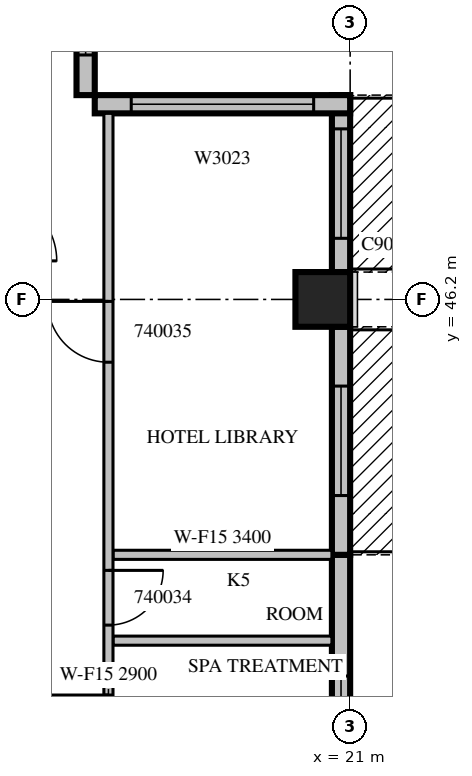
"""IFC4 building model, lengths in metres.
Left out: names, types, materials, properties, quantities, classifications, styles, units other than length and angle.
Written with IfcOpenShell. Run it as: python <this file> out.ifc"""

import sys

from ifc_helpers import new_model, si_unit, direction, frame, frame_2d, origin, origin_2d, place, context, subcontext, project, spatial, rectangle, extrude, source, transform, mapped, element, fill, save


model = new_model("IFC4")
c1 = context("Model", 3, precision=1e-05, world=origin(), true_north=direction((0.0, 1.0)))
c2 = subcontext(c1, "Body", "Model", "MODEL_VIEW")
j1 = project(units=[si_unit("LENGTHUNIT", "METRE"), si_unit("PLANEANGLEUNIT", "RADIAN")], contexts=[c1])
p1 = place(None, origin())
s1 = spatial("IfcSite", under=j1, at=p1, CompositionType="ELEMENT")
p2 = place(p1, origin())
s2 = spatial("IfcBuilding", under=s1, at=p2, CompositionType="ELEMENT")
p3 = place(p2, frame((0.0, 0.0, 185.4)))
s3 = spatial("IfcBuildingStorey", under=s2, at=p3, CompositionType="ELEMENT", Elevation=185.4)
m1 = source(origin(), c2, "Body", "SweptSolid", [
    extrude(rectangle(XDim=0.9, YDim=0.9, at=origin_2d()), origin(), (0.0, 0.0, 1.0), 3.8),
])
p4 = place(p3, frame((20.55, 46.2, 0.0), z_axis=(0.0, 0.0, 1.0), x_axis=(1.0, 0.0, 0.0)))
e1 = element("IfcColumn", 1, at=p4, inside=s3, PredefinedType="COLUMN", context=c2, shape_type="MappedRepresentation", body=[
    mapped(m1, transform((0.0, 0.0, 0.0), scale=1.0)),
])
m2 = source(origin(), c2, "Body", "SweptSolid", [
    extrude(rectangle(XDim=3.75, YDim=0.3, at=frame_2d((1.875, 0.0))), origin(), (0.0, 0.0, 1.0), 3.4),
])
p5 = place(p3, frame((20.85, 38.25, 0.0), z_axis=(0.0, 0.0, 1.0), x_axis=(0.0, 1.0, 0.0)))
e2 = element("IfcWall", 2, at=p5, inside=s3, PredefinedType="STANDARD", context=c2, shape_type="MappedRepresentation", body=[
    mapped(m2, transform((0.0, 0.0, 0.0), scale=1.0)),
])
m3 = source(origin(), c2, "Body", "SweptSolid", [
    extrude(rectangle(XDim=1.2, YDim=2.3, at=frame_2d((0.6, 1.15))), frame((0.0, 0.16, 0.0), z_axis=(0.0, -1.0, 0.0), x_axis=(1.0, 0.0, 0.0)), (0.0, 0.0, 1.0), 0.32),
])
p6 = place(p5, frame((0.557, 0.0, 0.6)))
e3 = element("IfcOpeningElement", 3, at=p6, cuts=e2, PredefinedType="OPENING", context=c2, shape_type="MappedRepresentation", body=[
    mapped(m3, transform((0.0, 0.0, 0.0), scale=1.0)),
])
p7 = place(p3, frame((20.85, 42.0, 0.0), z_axis=(0.0, 0.0, 1.0), x_axis=(0.0, 1.0, 0.0)))
e4 = element("IfcWall", 4, at=p7, inside=s3, PredefinedType="STANDARD", context=c2, shape_type="MappedRepresentation", body=[
    mapped(m2, transform((0.0, 0.0, 0.0), scale=1.0)),
])
m4 = source(origin(), c2, "Body", "SweptSolid", [
    extrude(rectangle(XDim=1.8, YDim=2.4, at=frame_2d((0.9, 1.2))), frame((0.0, 0.16, 0.0), z_axis=(0.0, -1.0, 0.0), x_axis=(1.0, 0.0, 0.0)), (0.0, 0.0, 1.0), 0.32),
])
p8 = place(p7, frame((0.975, 0.0, 0.0)))
e5 = element("IfcOpeningElement", 5, at=p8, cuts=e4, PredefinedType="OPENING", context=c2, shape_type="MappedRepresentation", body=[
    mapped(m4, transform((0.0, 0.0, 0.0), scale=1.0)),
])
m5 = source(origin(), c2, "Body", "SweptSolid", [
    extrude(rectangle(XDim=2.91, YDim=0.3, at=frame_2d((1.455, 0.0))), origin(), (0.0, 0.0, 1.0), 3.4),
])
p9 = place(p3, frame((20.85, 46.65, 0.0), z_axis=(0.0, 0.0, 1.0), x_axis=(0.0, 1.0, 0.0)))
e6 = element("IfcWall", 6, at=p9, inside=s3, PredefinedType="STANDARD", context=c2, shape_type="MappedRepresentation", body=[
    mapped(m5, transform((0.0, 0.0, 0.0), scale=1.0)),
])
p10 = place(p9, frame((0.555, 0.0, 0.0)))
e7 = element("IfcOpeningElement", 7, at=p10, cuts=e6, PredefinedType="OPENING", context=c2, shape_type="MappedRepresentation", body=[
    mapped(m4, transform((0.0, 0.0, 0.0), scale=1.0)),
])
m6 = source(origin(), c2, "Body", "SweptSolid", [
    extrude(rectangle(XDim=4.2, YDim=0.3, at=frame_2d((2.1, 0.0))), origin(), (0.0, 0.0, 1.0), 3.4),
])
p11 = place(p3, frame((21.0, 49.41, 0.0), z_axis=(0.0, 0.0, 1.0), x_axis=(-1.0, 0.0, 0.0)))
e8 = element("IfcWall", 8, at=p11, inside=s3, PredefinedType="STANDARD", context=c2, shape_type="MappedRepresentation", body=[
    mapped(m6, transform((0.0, 0.0, 0.0), scale=1.0)),
])
m7 = source(origin(), c2, "Body", "SweptSolid", [
    extrude(rectangle(XDim=3.0, YDim=2.3, at=frame_2d((1.5, 1.15))), frame((0.0, 0.16, 0.0), z_axis=(0.0, -1.0, 0.0), x_axis=(1.0, 0.0, 0.0)), (0.0, 0.0, 1.0), 0.32),
])
p12 = place(p11, frame((0.6, 0.0, 0.6)))
e9 = element("IfcOpeningElement", 9, at=p12, cuts=e8, PredefinedType="OPENING", context=c2, shape_type="MappedRepresentation", body=[
    mapped(m7, transform((0.0, 0.0, 0.0), scale=1.0)),
])
m8 = source(origin(), c2, "Body", "SweptSolid", [
    extrude(rectangle(XDim=2.52, YDim=0.3, at=frame_2d((1.26, 0.0))), origin(), (0.0, 0.0, 1.0), 3.4),
])
p13 = place(p3, frame((16.65, 49.56, 0.0), z_axis=(0.0, 0.0, 1.0), x_axis=(0.0, 1.0, 0.0)))
e10 = element("IfcWall", 10, at=p13, inside=s3, PredefinedType="STANDARD", context=c2, shape_type="MappedRepresentation", body=[
    mapped(m8, transform((0.0, 0.0, 0.0), scale=1.0)),
])
p14 = place(p13, frame((0.66, 0.0, 0.6)))
e11 = element("IfcOpeningElement", 11, at=p14, cuts=e10, PredefinedType="OPENING", context=c2, shape_type="MappedRepresentation", body=[
    mapped(m3, transform((0.0, 0.0, 0.0), scale=1.0)),
])
m9 = source(origin(), c2, "Body", "SweptSolid", [
    extrude(rectangle(XDim=3.6, YDim=0.15, at=frame_2d((1.8, 0.0))), origin(), (0.0, 0.0, 1.0), 3.4),
])
for number, where, z_axis, x_axis in (
    (12, (17.1, 40.589, 0.0), (0.0, 0.0, 1.0), (1.0, 0.0, 0.0)),
    (13, (20.7, 42.0, 0.0), (0.0, 0.0, 1.0), (-1.0, 0.0, 0.0)),
):
    element("IfcWall", number, at=place(p3, frame(where, z_axis=z_axis, x_axis=x_axis)), inside=s3, PredefinedType="PARTITIONING", context=c2, shape_type="MappedRepresentation", body=[
        mapped(m9, transform((0.0, 0.0, 0.0), scale=1.0)),
    ])
p15 = place(p3, frame((17.025, 49.26, 0.0), z_axis=(0.0, 0.0, 1.0), x_axis=(0.0, -1.0, 0.0)))
e14 = element("IfcWall", 14, at=p15, inside=s3, PredefinedType="PARTITIONING", context=c2, shape_type="SweptSolid", body=[
    extrude(rectangle(XDim=19.86, YDim=0.15, at=frame_2d((9.93, 0.0))), origin(), (0.0, 0.0, 1.0), 2.9),
])
m10 = source(origin(), c2, "Body", "SweptSolid", [
    extrude(rectangle(XDim=1.0, YDim=2.1, at=frame_2d((0.5, 1.05))), frame((0.0, 0.085, 0.0), z_axis=(0.0, -1.0, 0.0), x_axis=(1.0, 0.0, 0.0)), (0.0, 0.0, 1.0), 0.17),
])
p16 = place(p15, frame((17.503, 0.0, 0.0)))
e15 = element("IfcOpeningElement", 15, at=p16, cuts=e14, PredefinedType="OPENING", context=c2, shape_type="MappedRepresentation", body=[
    mapped(m10, transform((0.0, 0.0, 0.0), scale=1.0)),
])
p17 = place(p15, frame((14.191, 0.0, 0.0)))
e16 = element("IfcOpeningElement", 16, at=p17, cuts=e14, PredefinedType="OPENING", context=c2, shape_type="MappedRepresentation", body=[
    mapped(m10, transform((0.0, 0.0, 0.0), scale=1.0)),
])
p18 = place(p15, frame((11.848, 0.0, 0.0)))
e17 = element("IfcOpeningElement", 17, at=p18, cuts=e14, PredefinedType="OPENING", context=c2, shape_type="MappedRepresentation", body=[
    mapped(m10, transform((0.0, 0.0, 0.0), scale=1.0)),
])
p19 = place(p15, frame((9.566, 0.0, 0.0)))
e18 = element("IfcOpeningElement", 18, at=p19, cuts=e14, PredefinedType="OPENING", context=c2, shape_type="MappedRepresentation", body=[
    mapped(m10, transform((0.0, 0.0, 0.0), scale=1.0)),
])
m11 = source(origin(), c2, "Body", "SweptSolid", [
    extrude(rectangle(XDim=0.9, YDim=2.1, at=frame_2d((0.45, 1.05))), frame((0.0, 0.085, 0.0), z_axis=(0.0, -1.0, 0.0), x_axis=(1.0, 0.0, 0.0)), (0.0, 0.0, 1.0), 0.17),
])
p20 = place(p15, frame((7.516, 0.0, 0.0)))
e19 = element("IfcOpeningElement", 19, at=p20, cuts=e14, PredefinedType="OPENING", context=c2, shape_type="MappedRepresentation", body=[
    mapped(m11, transform((0.0, 0.0, 0.0), scale=1.0)),
])
p21 = place(p15, frame((3.092, 0.0, 0.0)))
e20 = element("IfcOpeningElement", 20, at=p21, cuts=e14, PredefinedType="OPENING", context=c2, shape_type="MappedRepresentation", body=[
    mapped(m10, transform((0.0, 0.0, 0.0), scale=1.0)),
])
m12 = source(origin(), c2, "Body", "SweptSolid", [
    extrude(rectangle(XDim=1.2, YDim=2.3, at=frame_2d((0.6, 1.15))), frame((0.0, 0.03, 0.0), z_axis=(0.0, -1.0, 0.0), x_axis=(1.0, 0.0, 0.0)), (0.0, 0.0, 1.0), 0.06),
])
p22 = place(p6, origin())
e21 = element("IfcWindow", 21, at=p22, inside=s3, PartitioningType="SINGLE_PANEL", PredefinedType="WINDOW", context=c2, shape_type="MappedRepresentation", body=[
    mapped(m12, transform((0.0, 0.0, 0.0), scale=1.0)),
])
fill(e3, e21)
m13 = source(origin(), c2, "Body", "SweptSolid", [
    extrude(rectangle(XDim=1.8, YDim=2.4, at=frame_2d((0.9, 1.2))), frame((0.0, 0.025, 0.0), z_axis=(0.0, -1.0, 0.0), x_axis=(1.0, 0.0, 0.0)), (0.0, 0.0, 1.0), 0.05),
])
p23 = place(p8, origin())
e22 = element("IfcDoor", 22, at=p23, inside=s3, OperationType="SLIDING_TO_LEFT", PredefinedType="DOOR", context=c2, shape_type="MappedRepresentation", body=[
    mapped(m13, transform((0.0, 0.0, 0.0), scale=1.0)),
])
fill(e5, e22)
p24 = place(p10, origin())
e23 = element("IfcDoor", 23, at=p24, inside=s3, OperationType="SLIDING_TO_LEFT", PredefinedType="DOOR", context=c2, shape_type="MappedRepresentation", body=[
    mapped(m13, transform((0.0, 0.0, 0.0), scale=1.0)),
])
fill(e7, e23)
m14 = source(origin(), c2, "Body", "SweptSolid", [
    extrude(rectangle(XDim=3.0, YDim=2.3, at=frame_2d((1.5, 1.15))), frame((0.0, 0.03, 0.0), z_axis=(0.0, -1.0, 0.0), x_axis=(1.0, 0.0, 0.0)), (0.0, 0.0, 1.0), 0.06),
])
p25 = place(p12, origin())
e24 = element("IfcWindow", 24, at=p25, inside=s3, PartitioningType="SINGLE_PANEL", PredefinedType="WINDOW", context=c2, shape_type="MappedRepresentation", body=[
    mapped(m14, transform((0.0, 0.0, 0.0), scale=1.0)),
])
fill(e9, e24)
p26 = place(p14, origin())
e25 = element("IfcWindow", 25, at=p26, inside=s3, PartitioningType="SINGLE_PANEL", PredefinedType="WINDOW", context=c2, shape_type="MappedRepresentation", body=[
    mapped(m12, transform((0.0, 0.0, 0.0), scale=1.0)),
])
fill(e11, e25)
m15 = source(origin(), c2, "Body", "SweptSolid", [
    extrude(rectangle(XDim=1.0, YDim=2.1, at=frame_2d((0.5, 1.05))), frame((0.0, 0.025, 0.0), z_axis=(0.0, -1.0, 0.0), x_axis=(1.0, 0.0, 0.0)), (0.0, 0.0, 1.0), 0.05),
])
p27 = place(p19, origin())
e26 = element("IfcDoor", 26, at=p27, inside=s3, OperationType="SINGLE_SWING_RIGHT", PredefinedType="DOOR", context=c2, shape_type="MappedRepresentation", body=[
    mapped(m15, transform((0.0, 0.0, 0.0), scale=1.0)),
])
fill(e18, e26)
m16 = source(origin(), c2, "Body", "SweptSolid", [
    extrude(rectangle(XDim=0.9, YDim=2.1, at=frame_2d((0.45, 1.05))), frame((0.0, 0.025, 0.0), z_axis=(0.0, -1.0, 0.0), x_axis=(1.0, 0.0, 0.0)), (0.0, 0.0, 1.0), 0.05),
])
p28 = place(p20, origin())
e27 = element("IfcDoor", 27, at=p28, inside=s3, OperationType="SINGLE_SWING_LEFT", PredefinedType="DOOR", context=c2, shape_type="MappedRepresentation", body=[
    mapped(m16, transform((0.0, 0.0, 0.0), scale=1.0)),
])
fill(e19, e27)
p29 = place(p21, origin())
e28 = element("IfcDoor", 28, at=p29, inside=s3, OperationType="SINGLE_SWING_RIGHT", PredefinedType="DOOR", context=c2, shape_type="MappedRepresentation", body=[
    mapped(m15, transform((0.0, 0.0, 0.0), scale=1.0)),
])
fill(e20, e28)
save(model, sys.argv[1])
